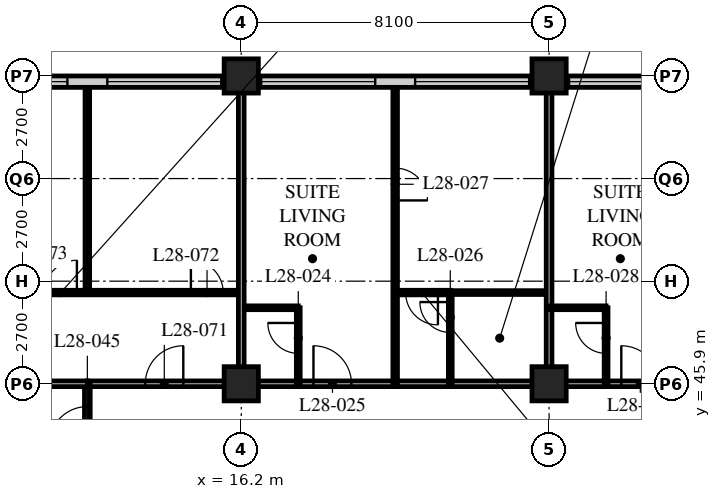
"""IFC4 building model, lengths in metres.
Left out: names, types, materials, properties, quantities, classifications, styles, units other than length and angle.
Written with IfcOpenShell. Run it as: python <this file> out.ifc"""

import sys

from ifc_helpers import new_model, si_unit, direction, frame, frame_2d, origin, origin_2d, place, context, subcontext, project, spatial, rectangle, hollow_rectangle, extrude, element, fill, save


model = new_model("IFC4")
c1 = context("Model", 3, precision=1e-05, world=origin(), true_north=direction((0.0, 1.0)))
c2 = subcontext(c1, "Body", "Model", "MODEL_VIEW")
j1 = project(units=[si_unit("LENGTHUNIT", "METRE"), si_unit("PLANEANGLEUNIT", "RADIAN")], contexts=[c1])
p1 = place(None, origin())
s1 = spatial("IfcSite", under=j1, at=p1, CompositionType="ELEMENT")
p2 = place(p1, origin())
s2 = spatial("IfcBuilding", under=s1, at=p2, CompositionType="ELEMENT")
p3 = place(p2, frame((0.0, 0.0, 113.6)))
s3 = spatial("IfcBuildingStorey", under=s2, at=p3, CompositionType="ELEMENT", Elevation=113.6)
for number, where, z_axis, x_axis in (
    (1, (16.2, 45.9, 0.0), (0.0, 0.0, 1.0), (1.0, 0.0, 0.0)),
    (2, (16.2, 54.0, 0.0), (0.0, 0.0, 1.0), (1.0, 0.0, 0.0)),
    (3, (24.3, 45.9, 0.0), (0.0, 0.0, 1.0), (1.0, 0.0, 0.0)),
    (4, (24.3, 54.0, 0.0), (0.0, 0.0, 1.0), (1.0, 0.0, 0.0)),
):
    element("IfcColumn", number, at=place(p3, frame(where, z_axis=z_axis, x_axis=x_axis)), inside=s3, PredefinedType="COLUMN", context=c2, shape_type="SweptSolid", body=[
        extrude(hollow_rectangle(XDim=0.9, YDim=0.9, WallThickness=0.09, at=origin_2d()), origin(), (0.0, 0.0, 1.0), 3.4),
    ])
p4 = place(p3, frame((48.3, 53.85, 0.0), z_axis=(0.0, 0.0, 1.0), x_axis=(-1.0, 0.0, 0.0)))
e5 = element("IfcWall", 5, at=p4, inside=s3, PredefinedType="SOLIDWALL", context=c2, shape_type="SweptSolid", body=[
    extrude(rectangle(XDim=40.2, YDim=0.3, at=frame_2d((20.1, 0.0))), origin(), (0.0, 0.0, 1.0), 3.19),
])
p5 = place(p4, frame((0.225, 0.0, 0.9)))
e6 = element("IfcOpeningElement", 6, at=p5, cuts=e5, PredefinedType="OPENING", context=c2, shape_type="SweptSolid", body=[
    extrude(rectangle(XDim=3.0, YDim=2.0, at=frame_2d((1.5, 1.0))), frame((0.0, 0.16, 0.0), z_axis=(0.0, -1.0, 0.0), x_axis=(1.0, 0.0, 0.0)), (0.0, 0.0, 1.0), 0.32),
])
p6 = place(p4, frame((4.275, 0.0, 0.9)))
e7 = element("IfcOpeningElement", 7, at=p6, cuts=e5, PredefinedType="OPENING", context=c2, shape_type="SweptSolid", body=[
    extrude(rectangle(XDim=3.0, YDim=2.0, at=frame_2d((1.5, 1.0))), frame((0.0, 0.16, 0.0), z_axis=(0.0, -1.0, 0.0), x_axis=(1.0, 0.0, 0.0)), (0.0, 0.0, 1.0), 0.32),
])
p7 = place(p4, frame((8.325, 0.0, 0.9)))
e8 = element("IfcOpeningElement", 8, at=p7, cuts=e5, PredefinedType="OPENING", context=c2, shape_type="SweptSolid", body=[
    extrude(rectangle(XDim=3.0, YDim=2.0, at=frame_2d((1.5, 1.0))), frame((0.0, 0.16, 0.0), z_axis=(0.0, -1.0, 0.0), x_axis=(1.0, 0.0, 0.0)), (0.0, 0.0, 1.0), 0.32),
])
p8 = place(p4, frame((12.375, 0.0, 0.9)))
e9 = element("IfcOpeningElement", 9, at=p8, cuts=e5, PredefinedType="OPENING", context=c2, shape_type="SweptSolid", body=[
    extrude(rectangle(XDim=3.0, YDim=2.0, at=frame_2d((1.5, 1.0))), frame((0.0, 0.16, 0.0), z_axis=(0.0, -1.0, 0.0), x_axis=(1.0, 0.0, 0.0)), (0.0, 0.0, 1.0), 0.32),
])
p9 = place(p4, frame((16.425, 0.0, 0.9)))
e10 = element("IfcOpeningElement", 10, at=p9, cuts=e5, PredefinedType="OPENING", context=c2, shape_type="SweptSolid", body=[
    extrude(rectangle(XDim=3.0, YDim=2.0, at=frame_2d((1.5, 1.0))), frame((0.0, 0.16, 0.0), z_axis=(0.0, -1.0, 0.0), x_axis=(1.0, 0.0, 0.0)), (0.0, 0.0, 1.0), 0.32),
])
p10 = place(p4, frame((20.475, 0.0, 0.9)))
e11 = element("IfcOpeningElement", 11, at=p10, cuts=e5, PredefinedType="OPENING", context=c2, shape_type="SweptSolid", body=[
    extrude(rectangle(XDim=3.0, YDim=2.0, at=frame_2d((1.5, 1.0))), frame((0.0, 0.16, 0.0), z_axis=(0.0, -1.0, 0.0), x_axis=(1.0, 0.0, 0.0)), (0.0, 0.0, 1.0), 0.32),
])
p11 = place(p4, frame((24.525, 0.0, 0.9)))
e12 = element("IfcOpeningElement", 12, at=p11, cuts=e5, PredefinedType="OPENING", context=c2, shape_type="SweptSolid", body=[
    extrude(rectangle(XDim=3.0, YDim=2.0, at=frame_2d((1.5, 1.0))), frame((0.0, 0.16, 0.0), z_axis=(0.0, -1.0, 0.0), x_axis=(1.0, 0.0, 0.0)), (0.0, 0.0, 1.0), 0.32),
])
p12 = place(p4, frame((28.575, 0.0, 0.9)))
e13 = element("IfcOpeningElement", 13, at=p12, cuts=e5, PredefinedType="OPENING", context=c2, shape_type="SweptSolid", body=[
    extrude(rectangle(XDim=3.0, YDim=2.0, at=frame_2d((1.5, 1.0))), frame((0.0, 0.16, 0.0), z_axis=(0.0, -1.0, 0.0), x_axis=(1.0, 0.0, 0.0)), (0.0, 0.0, 1.0), 0.32),
])
p13 = place(p4, frame((32.625, 0.0, 0.9)))
e14 = element("IfcOpeningElement", 14, at=p13, cuts=e5, PredefinedType="OPENING", context=c2, shape_type="SweptSolid", body=[
    extrude(rectangle(XDim=3.0, YDim=2.0, at=frame_2d((1.5, 1.0))), frame((0.0, 0.16, 0.0), z_axis=(0.0, -1.0, 0.0), x_axis=(1.0, 0.0, 0.0)), (0.0, 0.0, 1.0), 0.32),
])
p14 = place(p4, frame((36.675, 0.0, 0.9)))
e15 = element("IfcOpeningElement", 15, at=p14, cuts=e5, PredefinedType="OPENING", context=c2, shape_type="SweptSolid", body=[
    extrude(rectangle(XDim=3.0, YDim=2.0, at=frame_2d((1.5, 1.0))), frame((0.0, 0.16, 0.0), z_axis=(0.0, -1.0, 0.0), x_axis=(1.0, 0.0, 0.0)), (0.0, 0.0, 1.0), 0.32),
])
p15 = place(p3, frame((12.15, 45.9, 0.0), z_axis=(0.0, 0.0, 1.0), x_axis=(1.0, 0.0, 0.0)))
e16 = element("IfcWall", 16, at=p15, inside=s3, PredefinedType="PARTITIONING", context=c2, shape_type="SweptSolid", body=[
    extrude(rectangle(XDim=32.4, YDim=0.15, at=frame_2d((16.2, 0.0))), origin(), (0.0, 0.0, 1.0), 2.578),
])
p16 = place(p15, frame((5.95, 0.0, 0.0)))
e17 = element("IfcOpeningElement", 17, at=p16, cuts=e16, PredefinedType="OPENING", context=c2, shape_type="SweptSolid", body=[
    extrude(rectangle(XDim=1.0, YDim=2.1, at=frame_2d((0.5, 1.05))), frame((0.0, 0.085, 0.0), z_axis=(0.0, -1.0, 0.0), x_axis=(1.0, 0.0, 0.0)), (0.0, 0.0, 1.0), 0.17),
])
p17 = place(p15, frame((14.05, 0.0, 0.0)))
e18 = element("IfcOpeningElement", 18, at=p17, cuts=e16, PredefinedType="OPENING", context=c2, shape_type="SweptSolid", body=[
    extrude(rectangle(XDim=1.0, YDim=2.1, at=frame_2d((0.5, 1.05))), frame((0.0, 0.085, 0.0), z_axis=(0.0, -1.0, 0.0), x_axis=(1.0, 0.0, 0.0)), (0.0, 0.0, 1.0), 0.17),
])
p18 = place(p15, frame((25.7, 0.0, 0.0)))
e19 = element("IfcOpeningElement", 19, at=p18, cuts=e16, PredefinedType="OPENING", context=c2, shape_type="SweptSolid", body=[
    extrude(rectangle(XDim=1.0, YDim=2.1, at=frame_2d((0.5, 1.05))), frame((0.0, 0.085, 0.0), z_axis=(0.0, -1.0, 0.0), x_axis=(1.0, 0.0, 0.0)), (0.0, 0.0, 1.0), 0.17),
])
p19 = place(p15, frame((29.875, 0.0, 0.0)))
e20 = element("IfcOpeningElement", 20, at=p19, cuts=e16, PredefinedType="OPENING", context=c2, shape_type="SweptSolid", body=[
    extrude(rectangle(XDim=1.0, YDim=2.1, at=frame_2d((0.5, 1.05))), frame((0.0, 0.085, 0.0), z_axis=(0.0, -1.0, 0.0), x_axis=(1.0, 0.0, 0.0)), (0.0, 0.0, 1.0), 0.17),
])
p20 = place(p15, frame((1.525, 0.0, 0.0)))
e21 = element("IfcOpeningElement", 21, at=p20, cuts=e16, PredefinedType="OPENING", context=c2, shape_type="SweptSolid", body=[
    extrude(rectangle(XDim=1.0, YDim=2.1, at=frame_2d((0.5, 1.05))), frame((0.0, 0.085, 0.0), z_axis=(0.0, -1.0, 0.0), x_axis=(1.0, 0.0, 0.0)), (0.0, 0.0, 1.0), 0.17),
])
p21 = place(p3, frame((12.15, 17.55, 0.0), z_axis=(0.0, 0.0, 1.0), x_axis=(0.0, 1.0, 0.0)))
e22 = element("IfcWall", 22, at=p21, inside=s3, PredefinedType="PARTITIONING", context=c2, shape_type="SweptSolid", body=[
    extrude(rectangle(XDim=28.35, YDim=0.15, at=frame_2d((14.175, 0.0))), origin(), (0.0, 0.0, 1.0), 3.19),
])
p22 = place(p21, frame((5.45, 0.0, 0.0)))
e23 = element("IfcOpeningElement", 23, at=p22, cuts=e22, PredefinedType="OPENING", context=c2, shape_type="SweptSolid", body=[
    extrude(rectangle(XDim=1.0, YDim=2.1, at=frame_2d((0.5, 1.05))), frame((0.0, 0.085, 0.0), z_axis=(0.0, -1.0, 0.0), x_axis=(1.0, 0.0, 0.0)), (0.0, 0.0, 1.0), 0.17),
])
p23 = place(p21, frame((13.55, 0.0, 0.0)))
e24 = element("IfcOpeningElement", 24, at=p23, cuts=e22, PredefinedType="OPENING", context=c2, shape_type="SweptSolid", body=[
    extrude(rectangle(XDim=1.0, YDim=2.1, at=frame_2d((0.5, 1.05))), frame((0.0, 0.085, 0.0), z_axis=(0.0, -1.0, 0.0), x_axis=(1.0, 0.0, 0.0)), (0.0, 0.0, 1.0), 0.17),
])
p24 = place(p21, frame((21.65, 0.0, 0.0)))
e25 = element("IfcOpeningElement", 25, at=p24, cuts=e22, PredefinedType="OPENING", context=c2, shape_type="SweptSolid", body=[
    extrude(rectangle(XDim=1.0, YDim=2.1, at=frame_2d((0.5, 1.05))), frame((0.0, 0.085, 0.0), z_axis=(0.0, -1.0, 0.0), x_axis=(1.0, 0.0, 0.0)), (0.0, 0.0, 1.0), 0.17),
])
p25 = place(p21, frame((26.75, 0.0, 0.0)))
e26 = element("IfcOpeningElement", 26, at=p25, cuts=e22, PredefinedType="OPENING", context=c2, shape_type="SweptSolid", body=[
    extrude(rectangle(XDim=1.0, YDim=2.1, at=frame_2d((0.5, 1.05))), frame((0.0, 0.085, 0.0), z_axis=(0.0, -1.0, 0.0), x_axis=(1.0, 0.0, 0.0)), (0.0, 0.0, 1.0), 0.17),
])
p26 = place(p3, frame((16.2, 47.9, 0.0), z_axis=(0.0, 0.0, 1.0), x_axis=(1.0, 0.0, 0.0)))
e27 = element("IfcWall", 27, at=p26, inside=s3, PredefinedType="PARTITIONING", context=c2, shape_type="SweptSolid", body=[
    extrude(rectangle(XDim=1.5, YDim=0.1, at=frame_2d((0.75, 0.0))), origin(), (0.0, 0.0, 1.0), 3.19),
])
p27 = place(p3, frame((17.7, 45.9, 0.0), z_axis=(0.0, 0.0, 1.0), x_axis=(0.0, 1.0, 0.0)))
e28 = element("IfcWall", 28, at=p27, inside=s3, PredefinedType="PARTITIONING", context=c2, shape_type="SweptSolid", body=[
    extrude(rectangle(XDim=2.0, YDim=0.1, at=frame_2d((1.0, 0.0))), origin(), (0.0, 0.0, 1.0), 3.19),
])
p28 = place(p27, frame((0.8, 0.0, 0.0)))
e29 = element("IfcOpeningElement", 29, at=p28, cuts=e28, PredefinedType="OPENING", context=c2, shape_type="SweptSolid", body=[
    extrude(rectangle(XDim=0.8, YDim=2.1, at=frame_2d((0.4, 1.05))), frame((0.0, 0.06, 0.0), z_axis=(0.0, -1.0, 0.0), x_axis=(1.0, 0.0, 0.0)), (0.0, 0.0, 1.0), 0.12),
])
p29 = place(p3, frame((21.7, 48.3, 0.0), z_axis=(0.0, 0.0, 1.0), x_axis=(1.0, 0.0, 0.0)))
e30 = element("IfcWall", 30, at=p29, inside=s3, PredefinedType="PARTITIONING", context=c2, shape_type="SweptSolid", body=[
    extrude(rectangle(XDim=2.6, YDim=0.1, at=frame_2d((1.3, 0.0))), origin(), (0.0, 0.0, 1.0), 3.19),
])
p30 = place(p3, frame((21.7, 45.9, 0.0), z_axis=(0.0, 0.0, 1.0), x_axis=(0.0, 1.0, 0.0)))
e31 = element("IfcWall", 31, at=p30, inside=s3, PredefinedType="PARTITIONING", context=c2, shape_type="SweptSolid", body=[
    extrude(rectangle(XDim=2.4, YDim=0.1, at=frame_2d((1.2, 0.0))), origin(), (0.0, 0.0, 1.0), 3.19),
])
p31 = place(p30, frame((1.35, 0.0, 0.0)))
e32 = element("IfcOpeningElement", 32, at=p31, cuts=e31, PredefinedType="OPENING", context=c2, shape_type="SweptSolid", body=[
    extrude(rectangle(XDim=0.8, YDim=2.1, at=frame_2d((0.4, 1.05))), frame((0.0, 0.06, 0.0), z_axis=(0.0, -1.0, 0.0), x_axis=(1.0, 0.0, 0.0)), (0.0, 0.0, 1.0), 0.12),
])
p32 = place(p3, frame((20.25, 45.9, 0.0), z_axis=(0.0, 0.0, 1.0), x_axis=(0.0, 1.0, 0.0)))
e33 = element("IfcWall", 33, at=p32, inside=s3, PredefinedType="PARTITIONING", context=c2, shape_type="SweptSolid", body=[
    extrude(rectangle(XDim=7.8, YDim=0.12, at=frame_2d((3.9, 0.0))), origin(), (0.0, 0.0, 1.0), 3.19),
])
p33 = place(p32, frame((4.825, 0.0, 0.0)))
e34 = element("IfcOpeningElement", 34, at=p33, cuts=e33, PredefinedType="OPENING", context=c2, shape_type="SweptSolid", body=[
    extrude(rectangle(XDim=0.85, YDim=2.1, at=frame_2d((0.425, 1.05))), frame((0.0, 0.07, 0.0), z_axis=(0.0, -1.0, 0.0), x_axis=(1.0, 0.0, 0.0)), (0.0, 0.0, 1.0), 0.14),
])
p34 = place(p3, frame((24.3, 45.9, 0.0), z_axis=(0.0, 0.0, 1.0), x_axis=(0.0, 1.0, 0.0)))
e35 = element("IfcWall", 35, at=p34, inside=s3, PredefinedType="PARTITIONING", context=c2, shape_type="SweptSolid", body=[
    extrude(rectangle(XDim=7.8, YDim=0.15, at=frame_2d((3.9, 0.0))), origin(), (0.0, 0.0, 1.0), 2.578),
])
p35 = place(p3, frame((24.3, 47.9, 0.0), z_axis=(0.0, 0.0, 1.0), x_axis=(1.0, 0.0, 0.0)))
e36 = element("IfcWall", 36, at=p35, inside=s3, PredefinedType="PARTITIONING", context=c2, shape_type="SweptSolid", body=[
    extrude(rectangle(XDim=1.5, YDim=0.1, at=frame_2d((0.75, 0.0))), origin(), (0.0, 0.0, 1.0), 3.19),
])
p36 = place(p3, frame((25.8, 45.9, 0.0), z_axis=(0.0, 0.0, 1.0), x_axis=(0.0, 1.0, 0.0)))
e37 = element("IfcWall", 37, at=p36, inside=s3, PredefinedType="PARTITIONING", context=c2, shape_type="SweptSolid", body=[
    extrude(rectangle(XDim=2.0, YDim=0.1, at=frame_2d((1.0, 0.0))), origin(), (0.0, 0.0, 1.0), 3.19),
])
p37 = place(p36, frame((0.8, 0.0, 0.0)))
e38 = element("IfcOpeningElement", 38, at=p37, cuts=e37, PredefinedType="OPENING", context=c2, shape_type="SweptSolid", body=[
    extrude(rectangle(XDim=0.8, YDim=2.1, at=frame_2d((0.4, 1.05))), frame((0.0, 0.06, 0.0), z_axis=(0.0, -1.0, 0.0), x_axis=(1.0, 0.0, 0.0)), (0.0, 0.0, 1.0), 0.12),
])
p38 = place(p3, frame((8.15, 48.3, 0.0), z_axis=(0.0, 0.0, 1.0), x_axis=(1.0, 0.0, 0.0)))
e39 = element("IfcWall", 39, at=p38, inside=s3, PredefinedType="PARTITIONING", context=c2, shape_type="SweptSolid", body=[
    extrude(rectangle(XDim=8.05, YDim=0.12, at=frame_2d((4.025, 0.0))), origin(), (0.0, 0.0, 1.0), 3.19),
])
p39 = place(p38, frame((6.725, 0.0, 0.0)))
e40 = element("IfcOpeningElement", 40, at=p39, cuts=e39, PredefinedType="OPENING", context=c2, shape_type="SweptSolid", body=[
    extrude(rectangle(XDim=0.85, YDim=2.1, at=frame_2d((0.425, 1.05))), frame((0.0, 0.07, 0.0), z_axis=(0.0, -1.0, 0.0), x_axis=(1.0, 0.0, 0.0)), (0.0, 0.0, 1.0), 0.14),
])
p40 = place(p38, frame((2.875, 0.0, 0.0)))
e41 = element("IfcOpeningElement", 41, at=p40, cuts=e39, PredefinedType="OPENING", context=c2, shape_type="SweptSolid", body=[
    extrude(rectangle(XDim=0.85, YDim=2.1, at=frame_2d((0.425, 1.05))), frame((0.0, 0.07, 0.0), z_axis=(0.0, -1.0, 0.0), x_axis=(1.0, 0.0, 0.0)), (0.0, 0.0, 1.0), 0.14),
])
p41 = place(p3, frame((12.15, 48.3, 0.0), z_axis=(0.0, 0.0, 1.0), x_axis=(0.0, 1.0, 0.0)))
e42 = element("IfcWall", 42, at=p41, inside=s3, PredefinedType="PARTITIONING", context=c2, shape_type="SweptSolid", body=[
    extrude(rectangle(XDim=5.4, YDim=0.12, at=frame_2d((2.7, 0.0))), origin(), (0.0, 0.0, 1.0), 3.19),
])
p42 = place(p3, frame((4.35, 45.9, 0.0), z_axis=(0.0, 0.0, 1.0), x_axis=(1.0, 0.0, 0.0)))
e43 = element("IfcWall", 43, at=p42, inside=s3, PredefinedType="PARTITIONING", context=c2, shape_type="SweptSolid", body=[
    extrude(rectangle(XDim=7.8, YDim=0.15, at=frame_2d((3.9, 0.0))), origin(), (0.0, 0.0, 1.0), 2.578),
])
p43 = place(p3, frame((16.2, 45.9, 0.0), z_axis=(0.0, 0.0, 1.0), x_axis=(0.0, 1.0, 0.0)))
e44 = element("IfcWall", 44, at=p43, inside=s3, PredefinedType="PARTITIONING", context=c2, shape_type="SweptSolid", body=[
    extrude(rectangle(XDim=7.8, YDim=0.15, at=frame_2d((3.9, 0.0))), origin(), (0.0, 0.0, 1.0), 2.578),
])
p44 = place(p3, frame((20.25, 48.3, 0.0), z_axis=(0.0, 0.0, 1.0), x_axis=(1.0, 0.0, 0.0)))
e45 = element("IfcWall", 45, at=p44, inside=s3, PredefinedType="PARTITIONING", context=c2, shape_type="SweptSolid", body=[
    extrude(rectangle(XDim=1.46, YDim=0.12, at=frame_2d((0.73, 0.0))), origin(), (0.0, 0.0, 1.0), 3.19),
])
p45 = place(p44, frame((0.275, 0.0, 0.0)))
e46 = element("IfcOpeningElement", 46, at=p45, cuts=e45, PredefinedType="OPENING", context=c2, shape_type="SweptSolid", body=[
    extrude(rectangle(XDim=0.85, YDim=2.1, at=frame_2d((0.425, 1.05))), frame((0.0, 0.07, 0.0), z_axis=(0.0, -1.0, 0.0), x_axis=(1.0, 0.0, 0.0)), (0.0, 0.0, 1.0), 0.14),
])
p46 = place(p10, origin())
e47 = element("IfcWindow", 47, at=p46, inside=s3, PartitioningType="SINGLE_PANEL", PredefinedType="WINDOW", context=c2, shape_type="SweptSolid", body=[
    extrude(rectangle(XDim=3.0, YDim=2.0, at=frame_2d((1.5, 1.0))), frame((0.0, 0.03, 0.0), z_axis=(0.0, -1.0, 0.0), x_axis=(1.0, 0.0, 0.0)), (0.0, 0.0, 1.0), 0.06),
])
fill(e11, e47)
p47 = place(p11, origin())
e48 = element("IfcWindow", 48, at=p47, inside=s3, PartitioningType="SINGLE_PANEL", PredefinedType="WINDOW", context=c2, shape_type="SweptSolid", body=[
    extrude(rectangle(XDim=3.0, YDim=2.0, at=frame_2d((1.5, 1.0))), frame((0.0, 0.03, 0.0), z_axis=(0.0, -1.0, 0.0), x_axis=(1.0, 0.0, 0.0)), (0.0, 0.0, 1.0), 0.06),
])
fill(e12, e48)
p48 = place(p12, origin())
e49 = element("IfcWindow", 49, at=p48, inside=s3, PartitioningType="SINGLE_PANEL", PredefinedType="WINDOW", context=c2, shape_type="SweptSolid", body=[
    extrude(rectangle(XDim=3.0, YDim=2.0, at=frame_2d((1.5, 1.0))), frame((0.0, 0.03, 0.0), z_axis=(0.0, -1.0, 0.0), x_axis=(1.0, 0.0, 0.0)), (0.0, 0.0, 1.0), 0.06),
])
fill(e13, e49)
p49 = place(p13, origin())
e50 = element("IfcWindow", 50, at=p49, inside=s3, PartitioningType="SINGLE_PANEL", PredefinedType="WINDOW", context=c2, shape_type="SweptSolid", body=[
    extrude(rectangle(XDim=3.0, YDim=2.0, at=frame_2d((1.5, 1.0))), frame((0.0, 0.03, 0.0), z_axis=(0.0, -1.0, 0.0), x_axis=(1.0, 0.0, 0.0)), (0.0, 0.0, 1.0), 0.06),
])
fill(e14, e50)
p50 = place(p14, origin())
e51 = element("IfcWindow", 51, at=p50, inside=s3, PartitioningType="SINGLE_PANEL", PredefinedType="WINDOW", context=c2, shape_type="SweptSolid", body=[
    extrude(rectangle(XDim=3.0, YDim=2.0, at=frame_2d((1.5, 1.0))), frame((0.0, 0.03, 0.0), z_axis=(0.0, -1.0, 0.0), x_axis=(1.0, 0.0, 0.0)), (0.0, 0.0, 1.0), 0.06),
])
fill(e15, e51)
p51 = place(p28, origin())
e52 = element("IfcDoor", 52, at=p51, inside=s3, OperationType="SINGLE_SWING_RIGHT", PredefinedType="DOOR", context=c2, shape_type="SweptSolid", body=[
    extrude(rectangle(XDim=0.8, YDim=2.1, at=frame_2d((0.4, 1.05))), frame((0.0, 0.025, 0.0), z_axis=(0.0, -1.0, 0.0), x_axis=(1.0, 0.0, 0.0)), (0.0, 0.0, 1.0), 0.05),
])
fill(e29, e52)
p52 = place(p16, origin())
e53 = element("IfcDoor", 53, at=p52, inside=s3, OperationType="SINGLE_SWING_LEFT", PredefinedType="DOOR", context=c2, shape_type="SweptSolid", body=[
    extrude(rectangle(XDim=1.0, YDim=2.1, at=frame_2d((0.5, 1.05))), frame((0.0, 0.025, 0.0), z_axis=(0.0, -1.0, 0.0), x_axis=(1.0, 0.0, 0.0)), (0.0, 0.0, 1.0), 0.05),
])
fill(e17, e53)
p53 = place(p31, origin())
e54 = element("IfcDoor", 54, at=p53, inside=s3, OperationType="SINGLE_SWING_RIGHT", PredefinedType="DOOR", context=c2, shape_type="SweptSolid", body=[
    extrude(rectangle(XDim=0.8, YDim=2.1, at=frame_2d((0.4, 1.05))), frame((0.0, 0.025, 0.0), z_axis=(0.0, -1.0, 0.0), x_axis=(1.0, 0.0, 0.0)), (0.0, 0.0, 1.0), 0.05),
])
fill(e32, e54)
p54 = place(p33, origin())
e55 = element("IfcDoor", 55, at=p54, inside=s3, OperationType="SINGLE_SWING_RIGHT", PredefinedType="DOOR", context=c2, shape_type="SweptSolid", body=[
    extrude(rectangle(XDim=0.85, YDim=2.1, at=frame_2d((0.425, 1.05))), frame((0.0, 0.025, 0.0), z_axis=(0.0, -1.0, 0.0), x_axis=(1.0, 0.0, 0.0)), (0.0, 0.0, 1.0), 0.05),
])
fill(e34, e55)
p55 = place(p37, origin())
e56 = element("IfcDoor", 56, at=p55, inside=s3, OperationType="SINGLE_SWING_RIGHT", PredefinedType="DOOR", context=c2, shape_type="SweptSolid", body=[
    extrude(rectangle(XDim=0.8, YDim=2.1, at=frame_2d((0.4, 1.05))), frame((0.0, 0.025, 0.0), z_axis=(0.0, -1.0, 0.0), x_axis=(1.0, 0.0, 0.0)), (0.0, 0.0, 1.0), 0.05),
])
fill(e38, e56)
p56 = place(p17, origin())
e57 = element("IfcDoor", 57, at=p56, inside=s3, OperationType="SINGLE_SWING_LEFT", PredefinedType="DOOR", context=c2, shape_type="SweptSolid", body=[
    extrude(rectangle(XDim=1.0, YDim=2.1, at=frame_2d((0.5, 1.05))), frame((0.0, 0.025, 0.0), z_axis=(0.0, -1.0, 0.0), x_axis=(1.0, 0.0, 0.0)), (0.0, 0.0, 1.0), 0.05),
])
fill(e18, e57)
p57 = place(p25, origin())
e58 = element("IfcDoor", 58, at=p57, inside=s3, OperationType="SINGLE_SWING_LEFT", PredefinedType="DOOR", context=c2, shape_type="SweptSolid", body=[
    extrude(rectangle(XDim=1.0, YDim=2.1, at=frame_2d((0.5, 1.05))), frame((0.0, 0.025, 0.0), z_axis=(0.0, -1.0, 0.0), x_axis=(1.0, 0.0, 0.0)), (0.0, 0.0, 1.0), 0.05),
])
fill(e26, e58)
p58 = place(p20, origin())
e59 = element("IfcDoor", 59, at=p58, inside=s3, OperationType="SINGLE_SWING_RIGHT", PredefinedType="DOOR", context=c2, shape_type="SweptSolid", body=[
    extrude(rectangle(XDim=1.0, YDim=2.1, at=frame_2d((0.5, 1.05))), frame((0.0, 0.025, 0.0), z_axis=(0.0, -1.0, 0.0), x_axis=(1.0, 0.0, 0.0)), (0.0, 0.0, 1.0), 0.05),
])
fill(e21, e59)
p59 = place(p39, origin())
e60 = element("IfcDoor", 60, at=p59, inside=s3, OperationType="SINGLE_SWING_LEFT", PredefinedType="DOOR", context=c2, shape_type="SweptSolid", body=[
    extrude(rectangle(XDim=0.85, YDim=2.1, at=frame_2d((0.425, 1.05))), frame((0.0, 0.025, 0.0), z_axis=(0.0, -1.0, 0.0), x_axis=(1.0, 0.0, 0.0)), (0.0, 0.0, 1.0), 0.05),
])
fill(e40, e60)
p60 = place(p40, origin())
e61 = element("IfcDoor", 61, at=p60, inside=s3, OperationType="SINGLE_SWING_RIGHT", PredefinedType="DOOR", context=c2, shape_type="SweptSolid", body=[
    extrude(rectangle(XDim=0.85, YDim=2.1, at=frame_2d((0.425, 1.05))), frame((0.0, 0.025, 0.0), z_axis=(0.0, -1.0, 0.0), x_axis=(1.0, 0.0, 0.0)), (0.0, 0.0, 1.0), 0.05),
])
fill(e41, e61)
p61 = place(p45, origin())
e62 = element("IfcDoor", 62, at=p61, inside=s3, OperationType="SINGLE_SWING_LEFT", PredefinedType="DOOR", context=c2, shape_type="SweptSolid", body=[
    extrude(rectangle(XDim=0.85, YDim=2.1, at=frame_2d((0.425, 1.05))), frame((0.0, 0.025, 0.0), z_axis=(0.0, -1.0, 0.0), x_axis=(1.0, 0.0, 0.0)), (0.0, 0.0, 1.0), 0.05),
])
fill(e46, e62)
save(model, sys.argv[1])
